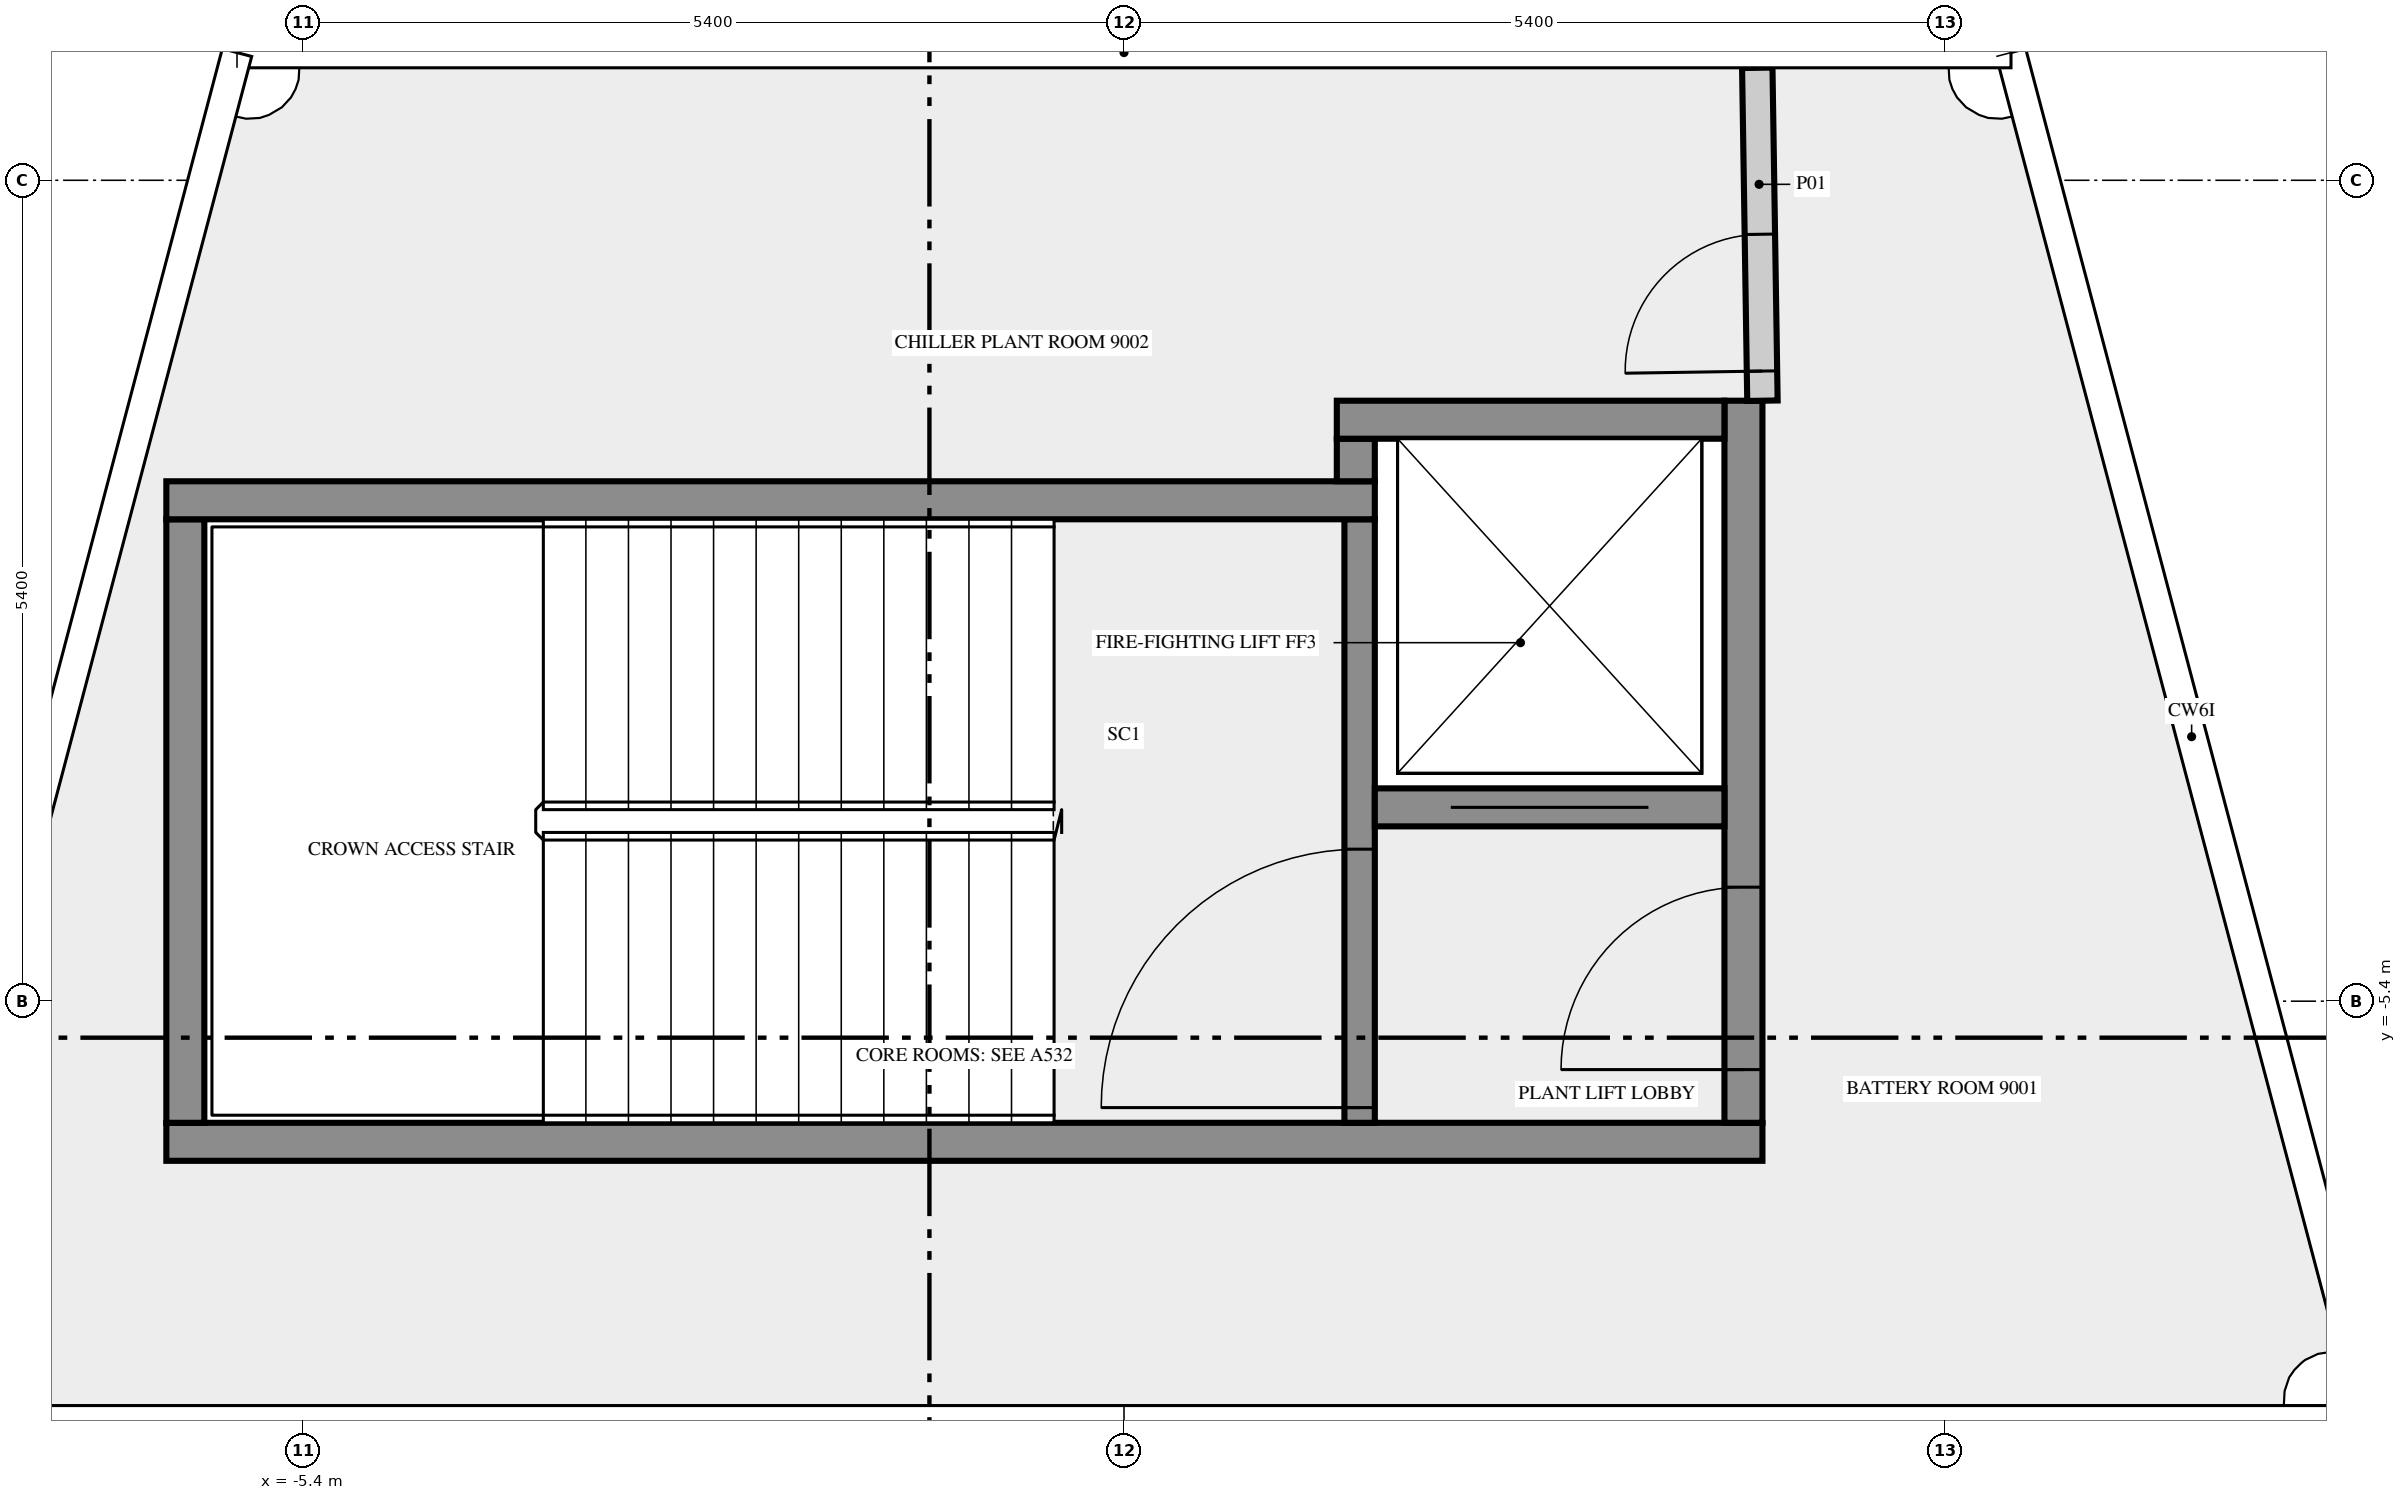
"""IFC4 building model, lengths in metres.
Left out: names, types, materials, properties, quantities, classifications, styles, units other than length and angle.
Written with IfcOpenShell. Run it as: python <this file> out.ifc"""

import sys

from ifc_helpers import new_model, si_unit, direction, frame, frame_2d, origin, place, context, subcontext, project, spatial, rectangle, extrude, element, fill, save


model = new_model("IFC4")
c1 = context("Model", 3, precision=1e-05, world=origin(), true_north=direction((0.0, 1.0)))
c2 = subcontext(c1, "Body", "Model", "MODEL_VIEW")
j1 = project(units=[si_unit("LENGTHUNIT", "METRE"), si_unit("PLANEANGLEUNIT", "RADIAN")], contexts=[c1])
p1 = place(None, origin())
s1 = spatial("IfcSite", under=j1, at=p1, CompositionType="ELEMENT")
p2 = place(p1, origin())
s2 = spatial("IfcBuilding", under=s1, at=p2, CompositionType="ELEMENT")
p3 = place(p2, frame((0.0, 0.0, 388.0)))
s3 = spatial("IfcBuildingStorey", under=s2, at=p3, CompositionType="ELEMENT", Elevation=388.0)
p4 = place(p3, frame((-6.3, -6.325, 0.0), z_axis=(0.0, 0.0, 1.0), x_axis=(1.0, 0.0, 0.0)))
e1 = element("IfcWall", 1, at=p4, inside=s3, PredefinedType="SHEAR", context=c2, shape_type="SweptSolid", body=[
    extrude(rectangle(XDim=10.5, YDim=0.25, at=frame_2d((5.25, 0.0))), origin(), (0.0, 0.0, 1.0), 3.75),
])
p5 = place(p3, frame((-6.175, -6.2, 0.0), z_axis=(0.0, 0.0, 1.0), x_axis=(0.0, 1.0, 0.0)))
e2 = element("IfcWall", 2, at=p5, inside=s3, PredefinedType="SHEAR", context=c2, shape_type="SweptSolid", body=[
    extrude(rectangle(XDim=3.97, YDim=0.25, at=frame_2d((1.985, 0.0))), origin(), (0.0, 0.0, 1.0), 3.75),
])
p6 = place(p3, frame((1.55, -6.2, 0.0), z_axis=(0.0, 0.0, 1.0), x_axis=(0.0, 1.0, 0.0)))
e3 = element("IfcWall", 3, at=p6, inside=s3, PredefinedType="SHEAR", context=c2, shape_type="SweptSolid", body=[
    extrude(rectangle(XDim=3.97, YDim=0.2, at=frame_2d((1.985, 0.0))), origin(), (0.0, 0.0, 1.0), 3.75),
])
p7 = place(p6, frame((0.1, 0.0, 0.0)))
e4 = element("IfcOpeningElement", 4, at=p7, cuts=e3, PredefinedType="OPENING", context=c2, shape_type="SweptSolid", body=[
    extrude(rectangle(XDim=1.7, YDim=2.1, at=frame_2d((0.85, 1.05))), frame((0.0, 0.11, 0.0), z_axis=(0.0, -1.0, 0.0), x_axis=(1.0, 0.0, 0.0)), (0.0, 0.0, 1.0), 0.22),
])
p8 = place(p3, frame((4.075, -6.2, 0.0), z_axis=(0.0, 0.0, 1.0), x_axis=(0.0, 1.0, 0.0)))
e5 = element("IfcWall", 5, at=p8, inside=s3, PredefinedType="SHEAR", context=c2, shape_type="SweptSolid", body=[
    extrude(rectangle(XDim=4.75, YDim=0.25, at=frame_2d((2.375, 0.0))), origin(), (0.0, 0.0, 1.0), 3.75),
])
p9 = place(p8, frame((0.35, 0.0, 0.0)))
e6 = element("IfcOpeningElement", 6, at=p9, cuts=e5, PredefinedType="OPENING", context=c2, shape_type="SweptSolid", body=[
    extrude(rectangle(XDim=1.2, YDim=2.1, at=frame_2d((0.6, 1.05))), frame((0.0, 0.135, 0.0), z_axis=(0.0, -1.0, 0.0), x_axis=(1.0, 0.0, 0.0)), (0.0, 0.0, 1.0), 0.27),
])
p10 = place(p3, frame((1.65, -4.125, 0.0), z_axis=(0.0, 0.0, 1.0), x_axis=(1.0, 0.0, 0.0)))
e7 = element("IfcWall", 7, at=p10, inside=s3, PredefinedType="SHEAR", context=c2, shape_type="SweptSolid", body=[
    extrude(rectangle(XDim=2.3, YDim=0.25, at=frame_2d((1.15, 0.0))), origin(), (0.0, 0.0, 1.0), 3.75),
])
p11 = place(p10, frame((0.5, 0.0, 0.0)))
e8 = element("IfcOpeningElement", 8, at=p11, cuts=e7, PredefinedType="OPENING", context=c2, shape_type="SweptSolid", body=[
    extrude(rectangle(XDim=1.3, YDim=2.1, at=frame_2d((0.65, 1.05))), frame((0.0, 0.135, 0.0), z_axis=(0.0, -1.0, 0.0), x_axis=(1.0, 0.0, 0.0)), (0.0, 0.0, 1.0), 0.27),
])
p12 = place(p3, frame((-6.3, -2.105, 0.0), z_axis=(0.0, 0.0, 1.0), x_axis=(1.0, 0.0, 0.0)))
e9 = element("IfcWall", 9, at=p12, inside=s3, PredefinedType="SHEAR", context=c2, shape_type="SweptSolid", body=[
    extrude(rectangle(XDim=7.95, YDim=0.25, at=frame_2d((3.975, 0.0))), origin(), (0.0, 0.0, 1.0), 3.75),
])
p13 = place(p3, frame((1.525, -1.98, 0.0), z_axis=(0.0, 0.0, 1.0), x_axis=(0.0, 1.0, 0.0)))
e10 = element("IfcWall", 10, at=p13, inside=s3, PredefinedType="SHEAR", context=c2, shape_type="SweptSolid", body=[
    extrude(rectangle(XDim=0.28, YDim=0.25, at=frame_2d((0.14, 0.0))), origin(), (0.0, 0.0, 1.0), 3.75),
])
p14 = place(p3, frame((1.4, -1.575, 0.0), z_axis=(0.0, 0.0, 1.0), x_axis=(1.0, 0.0, 0.0)))
e11 = element("IfcWall", 11, at=p14, inside=s3, PredefinedType="SHEAR", context=c2, shape_type="SweptSolid", body=[
    extrude(rectangle(XDim=2.55, YDim=0.25, at=frame_2d((1.275, 0.0))), origin(), (0.0, 0.0, 1.0), 3.75),
])
p15 = place(p3, frame((4.2, -1.45, 0.0), z_axis=(0.0, 0.0, 1.0), x_axis=(-0.015494237908, 0.999879957091, 0.0)))
e12 = element("IfcWall", 12, at=p15, inside=s3, PredefinedType="SOLIDWALL", context=c2, shape_type="SweptSolid", body=[
    extrude(rectangle(XDim=2.19, YDim=0.2, at=frame_2d((1.095, 0.0))), origin(), (0.0, 0.0, 1.0), 2.838),
])
p16 = place(p15, frame((0.195, 0.0, 0.0)))
e13 = element("IfcOpeningElement", 13, at=p16, cuts=e12, PredefinedType="OPENING", context=c2, shape_type="SweptSolid", body=[
    extrude(rectangle(XDim=0.9, YDim=2.1, at=frame_2d((0.45, 1.05))), frame((0.0, 0.11, 0.0), z_axis=(0.0, -1.0, 0.0), x_axis=(1.0, 0.0, 0.0)), (0.0, 0.0, 1.0), 0.22),
])
p17 = place(p7, origin())
e14 = element("IfcDoor", 14, at=p17, inside=s3, OperationType="DOUBLE_DOOR_SINGLE_SWING", PredefinedType="DOOR", context=c2, shape_type="SweptSolid", body=[
    extrude(rectangle(XDim=1.7, YDim=2.1, at=frame_2d((0.85, 1.05))), frame((0.0, 0.025, 0.0), z_axis=(0.0, -1.0, 0.0), x_axis=(1.0, 0.0, 0.0)), (0.0, 0.0, 1.0), 0.05),
])
fill(e4, e14)
p18 = place(p9, origin())
e15 = element("IfcDoor", 15, at=p18, inside=s3, OperationType="SINGLE_SWING_LEFT", PredefinedType="DOOR", context=c2, shape_type="SweptSolid", body=[
    extrude(rectangle(XDim=1.2, YDim=2.1, at=frame_2d((0.6, 1.05))), frame((0.0, 0.025, 0.0), z_axis=(0.0, -1.0, 0.0), x_axis=(1.0, 0.0, 0.0)), (0.0, 0.0, 1.0), 0.05),
])
fill(e6, e15)
p19 = place(p11, origin())
e16 = element("IfcDoor", 16, at=p19, inside=s3, OperationType="DOUBLE_DOOR_SLIDING", PredefinedType="DOOR", context=c2, shape_type="SweptSolid", body=[
    extrude(rectangle(XDim=1.3, YDim=2.1, at=frame_2d((0.65, 1.05))), frame((0.0, 0.025, 0.0), z_axis=(0.0, -1.0, 0.0), x_axis=(1.0, 0.0, 0.0)), (0.0, 0.0, 1.0), 0.05),
])
fill(e8, e16)
p20 = place(p16, origin())
e17 = element("IfcDoor", 17, at=p20, inside=s3, OperationType="SINGLE_SWING_RIGHT", PredefinedType="DOOR", context=c2, shape_type="SweptSolid", body=[
    extrude(rectangle(XDim=0.9, YDim=2.1, at=frame_2d((0.45, 1.05))), frame((0.0, 0.025, 0.0), z_axis=(0.0, -1.0, 0.0), x_axis=(1.0, 0.0, 0.0)), (0.0, 0.0, 1.0), 0.05),
])
fill(e13, e17)
save(model, sys.argv[1])
